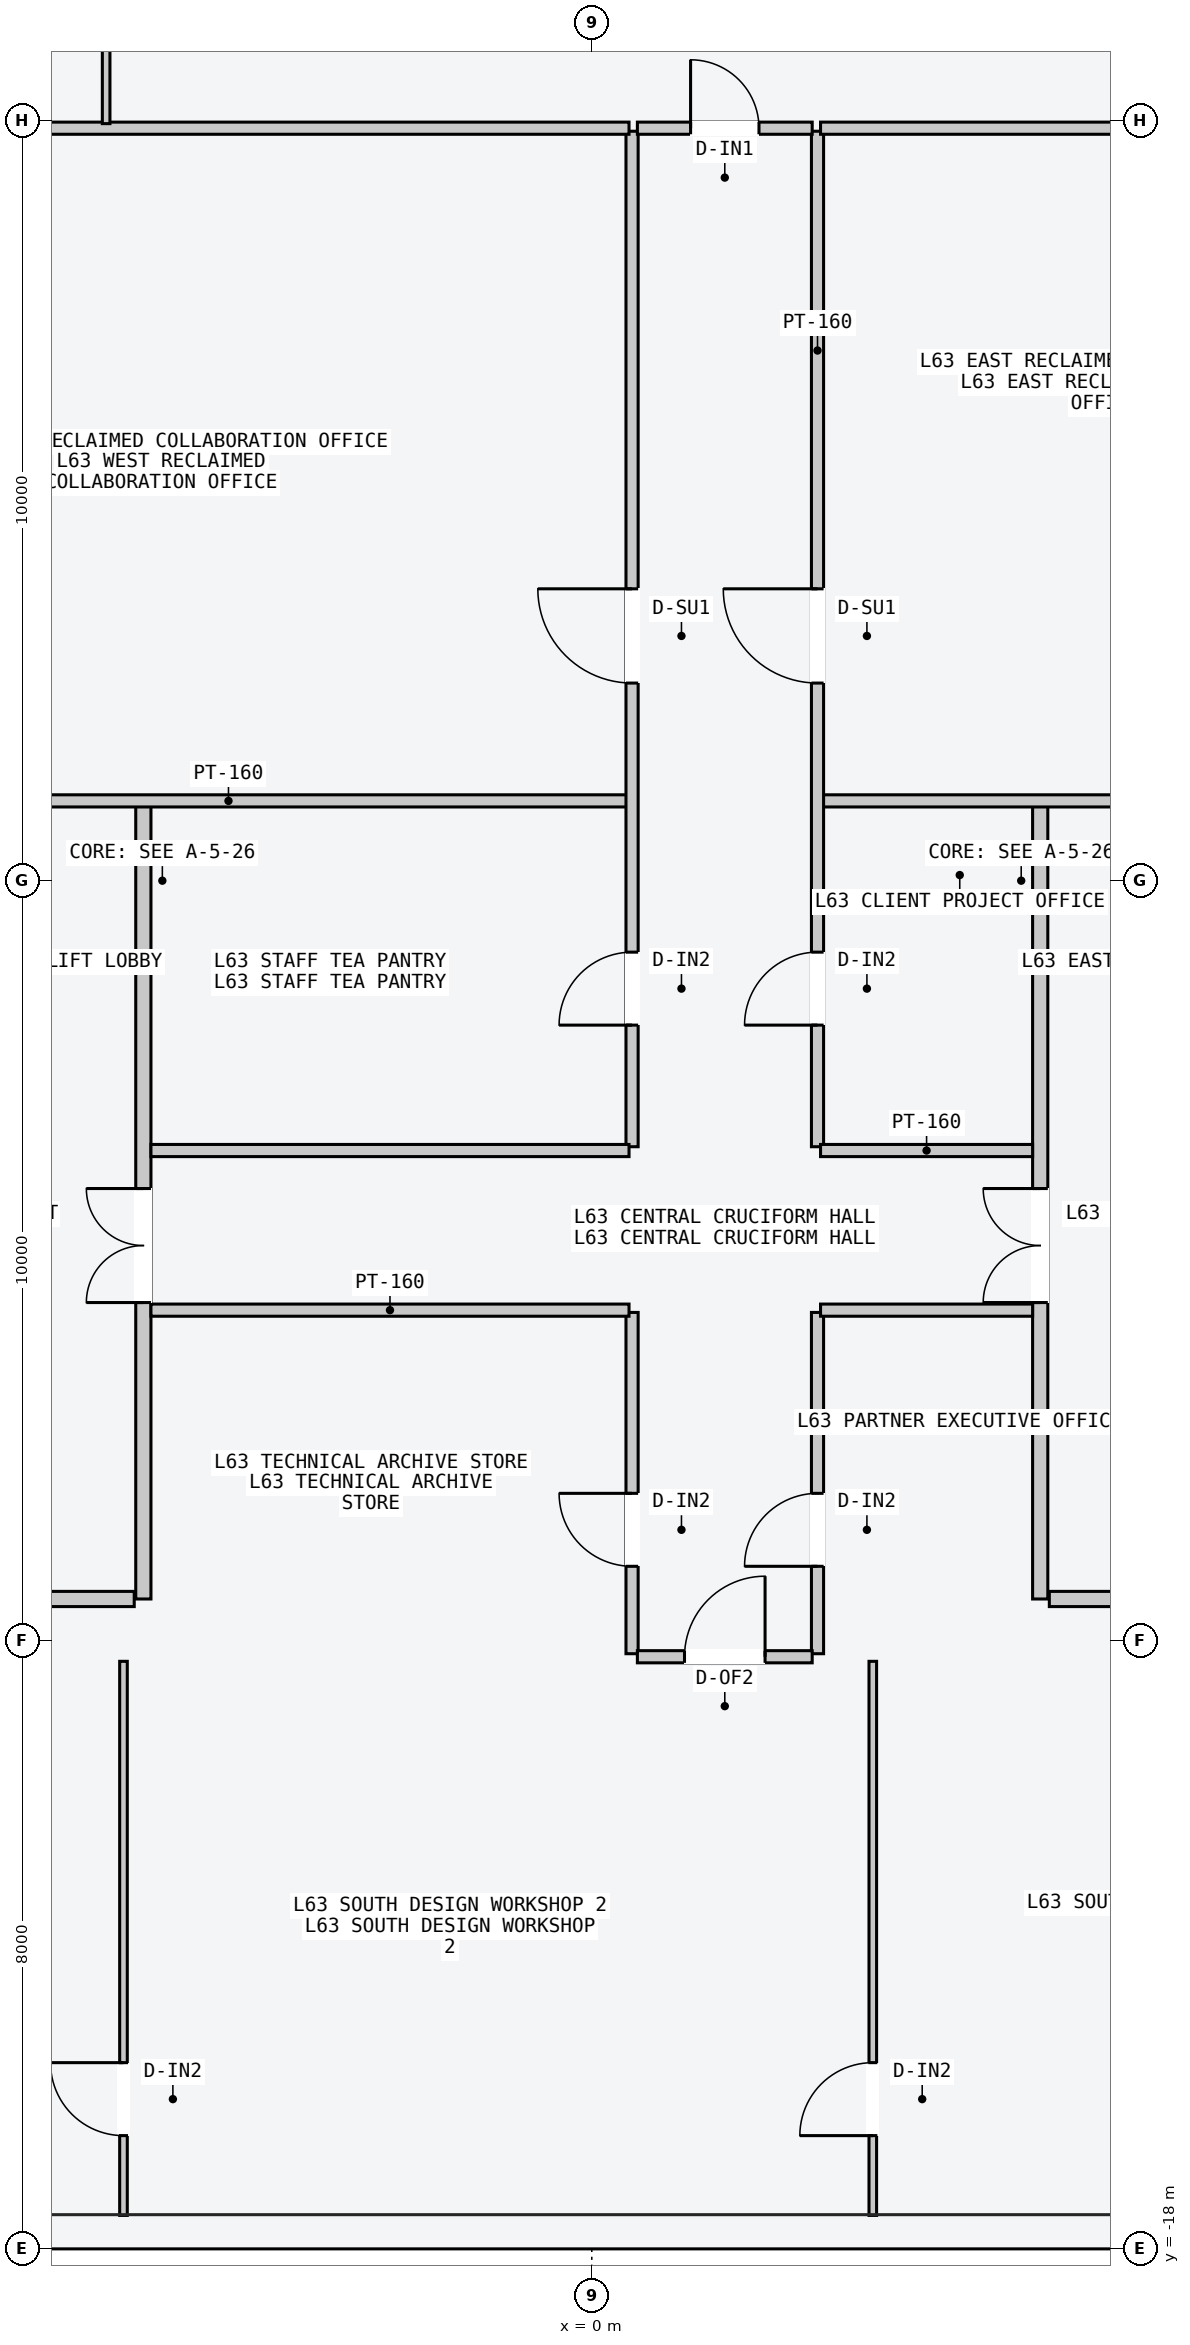
"""IFC4 building model, lengths in metres.
Left out: names, types, materials, properties, quantities, classifications, styles, units other than length and angle.
Written with IfcOpenShell. Run it as: python <this file> out.ifc"""

import sys

from ifc_helpers import new_model, si_unit, direction, frame, frame_2d, origin, place, context, subcontext, project, spatial, rectangle, extrude, element, fill, save


model = new_model("IFC4")
c1 = context("Model", 3, precision=1e-05, world=origin(), true_north=direction((0.0, 1.0)))
c2 = subcontext(c1, "Body", "Model", "MODEL_VIEW")
j1 = project(units=[si_unit("LENGTHUNIT", "METRE"), si_unit("PLANEANGLEUNIT", "RADIAN")], contexts=[c1])
p1 = place(None, origin())
s1 = spatial("IfcSite", under=j1, at=p1, CompositionType="ELEMENT")
p2 = place(p1, origin())
s2 = spatial("IfcBuilding", under=s1, at=p2, CompositionType="ELEMENT")
p3 = place(p2, frame((0.0, 0.0, 240.0)))
s3 = spatial("IfcBuildingStorey", under=s2, at=p3, CompositionType="ELEMENT", Elevation=240.0)
p4 = place(p3, frame((-5.9, -9.45, 0.0), z_axis=(0.0, 0.0, 1.0), x_axis=(0.0, 1.0, 0.0)))
e1 = element("IfcWall", 1, at=p4, inside=s3, PredefinedType="PARTITIONING", context=c2, shape_type="SweptSolid", body=[
    extrude(rectangle(XDim=10.5, YDim=0.2, at=frame_2d((5.25, 0.0))), origin(), (0.0, 0.0, 1.0), 3.4),
])
p5 = place(p4, frame((3.9, 0.0, 0.0)))
e2 = element("IfcOpeningElement", 2, at=p5, cuts=e1, PredefinedType="OPENING", context=c2, shape_type="SweptSolid", body=[
    extrude(rectangle(XDim=1.5, YDim=2.2, at=frame_2d((0.75, 1.1))), frame((0.0, 0.11, 0.0), z_axis=(0.0, -1.0, 0.0), x_axis=(1.0, 0.0, 0.0)), (0.0, 0.0, 1.0), 0.22),
])
p6 = place(p3, frame((-6.02, -9.45, 0.0), z_axis=(0.0, 0.0, 1.0), x_axis=(-1.0, 0.0, 0.0)))
e3 = element("IfcWall", 3, at=p6, inside=s3, PredefinedType="PARTITIONING", context=c2, shape_type="SweptSolid", body=[
    extrude(rectangle(XDim=1.8, YDim=0.2, at=frame_2d((0.9, 0.0))), origin(), (0.0, 0.0, 1.0), 3.4),
])
p7 = place(p3, frame((5.9, -9.45, 0.0), z_axis=(0.0, 0.0, 1.0), x_axis=(0.0, 1.0, 0.0)))
e4 = element("IfcWall", 4, at=p7, inside=s3, PredefinedType="PARTITIONING", context=c2, shape_type="SweptSolid", body=[
    extrude(rectangle(XDim=10.5, YDim=0.2, at=frame_2d((5.25, 0.0))), origin(), (0.0, 0.0, 1.0), 3.4),
])
p8 = place(p7, frame((3.9, 0.0, 0.0)))
e5 = element("IfcOpeningElement", 5, at=p8, cuts=e4, PredefinedType="OPENING", context=c2, shape_type="SweptSolid", body=[
    extrude(rectangle(XDim=1.5, YDim=2.2, at=frame_2d((0.75, 1.1))), frame((0.0, 0.11, 0.0), z_axis=(0.0, -1.0, 0.0), x_axis=(1.0, 0.0, 0.0)), (0.0, 0.0, 1.0), 0.22),
])
p9 = place(p3, frame((6.02, -9.45, 0.0), z_axis=(0.0, 0.0, 1.0), x_axis=(1.0, 0.0, 0.0)))
e6 = element("IfcWall", 6, at=p9, inside=s3, PredefinedType="PARTITIONING", context=c2, shape_type="SweptSolid", body=[
    extrude(rectangle(XDim=1.8, YDim=0.2, at=frame_2d((0.9, 0.0))), origin(), (0.0, 0.0, 1.0), 3.4),
])
p10 = place(p3, frame((-10.05, 1.05, 0.0), z_axis=(0.0, 0.0, 1.0), x_axis=(1.0, 0.0, 0.0)))
e7 = element("IfcWall", 7, at=p10, inside=s3, PredefinedType="PARTITIONING", context=c2, shape_type="SweptSolid", body=[
    extrude(rectangle(XDim=10.54, YDim=0.16, at=frame_2d((5.27, 0.0))), origin(), (0.0, 0.0, 1.0), 3.4),
])
p11 = place(p3, frame((0.53, -3.5, 0.0), z_axis=(0.0, 0.0, 1.0), x_axis=(0.0, 1.0, 0.0)))
e8 = element("IfcWall", 8, at=p11, inside=s3, PredefinedType="PARTITIONING", context=c2, shape_type="SweptSolid", body=[
    extrude(rectangle(XDim=13.36, YDim=0.16, at=frame_2d((6.68, 0.0))), origin(), (0.0, 0.0, 1.0), 3.4),
])
p12 = place(p11, frame((6.1, 0.0, 0.0)))
e9 = element("IfcOpeningElement", 9, at=p12, cuts=e8, PredefinedType="OPENING", context=c2, shape_type="SweptSolid", body=[
    extrude(rectangle(XDim=1.24, YDim=2.24, at=frame_2d((0.62, 1.12))), frame((0.0, 0.09, 0.0), z_axis=(0.0, -1.0, 0.0), x_axis=(1.0, 0.0, 0.0)), (0.0, 0.0, 1.0), 0.18),
])
p13 = place(p11, frame((1.6, 0.0, 0.0)))
e10 = element("IfcOpeningElement", 10, at=p13, cuts=e8, PredefinedType="OPENING", context=c2, shape_type="SweptSolid", body=[
    extrude(rectangle(XDim=0.96, YDim=2.18, at=frame_2d((0.48, 1.09))), frame((0.0, 0.09, 0.0), z_axis=(0.0, -1.0, 0.0), x_axis=(1.0, 0.0, 0.0)), (0.0, 0.0, 1.0), 0.18),
])
p14 = place(p3, frame((-7.5, 9.9, 0.0), z_axis=(0.0, 0.0, 1.0), x_axis=(1.0, 0.0, 0.0)))
e11 = element("IfcWall", 11, at=p14, inside=s3, PredefinedType="PARTITIONING", context=c2, shape_type="SweptSolid", body=[
    extrude(rectangle(XDim=7.99, YDim=0.16, at=frame_2d((3.995, 0.0))), origin(), (0.0, 0.0, 1.0), 3.4),
])
p15 = place(p3, frame((-5.8, -3.55, 0.0), z_axis=(0.0, 0.0, 1.0), x_axis=(1.0, 0.0, 0.0)))
e12 = element("IfcWall", 12, at=p15, inside=s3, PredefinedType="PARTITIONING", context=c2, shape_type="SweptSolid", body=[
    extrude(rectangle(XDim=6.29, YDim=0.16, at=frame_2d((3.145, 0.0))), origin(), (0.0, 0.0, 1.0), 3.4),
])
p16 = place(p3, frame((3.01, 1.05, 0.0), z_axis=(0.0, 0.0, 1.0), x_axis=(1.0, 0.0, 0.0)))
e13 = element("IfcWall", 13, at=p16, inside=s3, PredefinedType="PARTITIONING", context=c2, shape_type="SweptSolid", body=[
    extrude(rectangle(XDim=7.05, YDim=0.16, at=frame_2d((3.525, 0.0))), origin(), (0.0, 0.0, 1.0), 3.4),
])
p17 = place(p3, frame((2.97, -3.5, 0.0), z_axis=(0.0, 0.0, 1.0), x_axis=(0.0, 1.0, 0.0)))
e14 = element("IfcWall", 14, at=p17, inside=s3, PredefinedType="PARTITIONING", context=c2, shape_type="SweptSolid", body=[
    extrude(rectangle(XDim=13.36, YDim=0.16, at=frame_2d((6.68, 0.0))), origin(), (0.0, 0.0, 1.0), 3.4),
])
p18 = place(p17, frame((6.1, 0.0, 0.0)))
e15 = element("IfcOpeningElement", 15, at=p18, cuts=e14, PredefinedType="OPENING", context=c2, shape_type="SweptSolid", body=[
    extrude(rectangle(XDim=1.24, YDim=2.24, at=frame_2d((0.62, 1.12))), frame((0.0, 0.09, 0.0), z_axis=(0.0, -1.0, 0.0), x_axis=(1.0, 0.0, 0.0)), (0.0, 0.0, 1.0), 0.18),
])
p19 = place(p17, frame((1.6, 0.0, 0.0)))
e16 = element("IfcOpeningElement", 16, at=p19, cuts=e14, PredefinedType="OPENING", context=c2, shape_type="SweptSolid", body=[
    extrude(rectangle(XDim=0.96, YDim=2.18, at=frame_2d((0.48, 1.09))), frame((0.0, 0.09, 0.0), z_axis=(0.0, -1.0, 0.0), x_axis=(1.0, 0.0, 0.0)), (0.0, 0.0, 1.0), 0.18),
])
p20 = place(p3, frame((3.01, 9.9, 0.0), z_axis=(0.0, 0.0, 1.0), x_axis=(1.0, 0.0, 0.0)))
e17 = element("IfcWall", 17, at=p20, inside=s3, PredefinedType="PARTITIONING", context=c2, shape_type="SweptSolid", body=[
    extrude(rectangle(XDim=4.49, YDim=0.16, at=frame_2d((2.245, 0.0))), origin(), (0.0, 0.0, 1.0), 3.4),
])
p21 = place(p3, frame((3.01, -3.55, 0.0), z_axis=(0.0, 0.0, 1.0), x_axis=(1.0, 0.0, 0.0)))
e18 = element("IfcWall", 18, at=p21, inside=s3, PredefinedType="PARTITIONING", context=c2, shape_type="SweptSolid", body=[
    extrude(rectangle(XDim=2.79, YDim=0.16, at=frame_2d((1.395, 0.0))), origin(), (0.0, 0.0, 1.0), 3.4),
])
p22 = place(p3, frame((0.53, -10.17, 0.0), z_axis=(0.0, 0.0, 1.0), x_axis=(0.0, 1.0, 0.0)))
e19 = element("IfcWall", 19, at=p22, inside=s3, PredefinedType="PARTITIONING", context=c2, shape_type="SweptSolid", body=[
    extrude(rectangle(XDim=4.49, YDim=0.16, at=frame_2d((2.245, 0.0))), origin(), (0.0, 0.0, 1.0), 3.4),
])
p23 = place(p22, frame((1.15, 0.0, 0.0)))
e20 = element("IfcOpeningElement", 20, at=p23, cuts=e19, PredefinedType="OPENING", context=c2, shape_type="SweptSolid", body=[
    extrude(rectangle(XDim=0.96, YDim=2.18, at=frame_2d((0.48, 1.09))), frame((0.0, 0.09, 0.0), z_axis=(0.0, -1.0, 0.0), x_axis=(1.0, 0.0, 0.0)), (0.0, 0.0, 1.0), 0.18),
])
p24 = place(p3, frame((2.97, -10.17, 0.0), z_axis=(0.0, 0.0, 1.0), x_axis=(0.0, 1.0, 0.0)))
e21 = element("IfcWall", 21, at=p24, inside=s3, PredefinedType="PARTITIONING", context=c2, shape_type="SweptSolid", body=[
    extrude(rectangle(XDim=4.49, YDim=0.16, at=frame_2d((2.245, 0.0))), origin(), (0.0, 0.0, 1.0), 3.4),
])
p25 = place(p24, frame((1.15, 0.0, 0.0)))
e22 = element("IfcOpeningElement", 22, at=p25, cuts=e21, PredefinedType="OPENING", context=c2, shape_type="SweptSolid", body=[
    extrude(rectangle(XDim=0.96, YDim=2.18, at=frame_2d((0.48, 1.09))), frame((0.0, 0.09, 0.0), z_axis=(0.0, -1.0, 0.0), x_axis=(1.0, 0.0, 0.0)), (0.0, 0.0, 1.0), 0.18),
])
p26 = place(p3, frame((-5.8, -5.65, 0.0), z_axis=(0.0, 0.0, 1.0), x_axis=(1.0, 0.0, 0.0)))
e23 = element("IfcWall", 23, at=p26, inside=s3, PredefinedType="PARTITIONING", context=c2, shape_type="SweptSolid", body=[
    extrude(rectangle(XDim=6.29, YDim=0.16, at=frame_2d((3.145, 0.0))), origin(), (0.0, 0.0, 1.0), 3.4),
])
p27 = place(p3, frame((3.01, -5.65, 0.0), z_axis=(0.0, 0.0, 1.0), x_axis=(1.0, 0.0, 0.0)))
e24 = element("IfcWall", 24, at=p27, inside=s3, PredefinedType="PARTITIONING", context=c2, shape_type="SweptSolid", body=[
    extrude(rectangle(XDim=2.79, YDim=0.16, at=frame_2d((1.395, 0.0))), origin(), (0.0, 0.0, 1.0), 3.4),
])
p28 = place(p3, frame((-6.39, 9.96, 0.0), z_axis=(0.0, 0.0, 1.0), x_axis=(0.0, 1.0, 0.0)))
e25 = element("IfcWall", 25, at=p28, inside=s3, PredefinedType="PARTITIONING", context=c2, shape_type="SweptSolid", body=[
    extrude(rectangle(XDim=7.6, YDim=0.1, at=frame_2d((3.8, 0.0))), origin(), (0.0, 0.0, 1.0), 3.4),
])
p29 = place(p28, frame((1.15, 0.0, 0.0)))
e26 = element("IfcOpeningElement", 26, at=p29, cuts=e25, PredefinedType="OPENING", context=c2, shape_type="SweptSolid", body=[
    extrude(rectangle(XDim=0.96, YDim=2.18, at=frame_2d((0.48, 1.09))), frame((0.0, 0.06, 0.0), z_axis=(0.0, -1.0, 0.0), x_axis=(1.0, 0.0, 0.0)), (0.0, 0.0, 1.0), 0.12),
])
p30 = place(p3, frame((0.6, 9.9, 0.0), z_axis=(0.0, 0.0, 1.0), x_axis=(1.0, 0.0, 0.0)))
e27 = element("IfcWall", 27, at=p30, inside=s3, PredefinedType="PARTITIONING", context=c2, shape_type="SweptSolid", body=[
    extrude(rectangle(XDim=2.3, YDim=0.16, at=frame_2d((1.15, 0.0))), origin(), (0.0, 0.0, 1.0), 3.4),
])
p31 = place(p30, frame((0.7, 0.0, 0.0)))
e28 = element("IfcOpeningElement", 28, at=p31, cuts=e27, PredefinedType="OPENING", context=c2, shape_type="SweptSolid", body=[
    extrude(rectangle(XDim=0.9, YDim=2.15, at=frame_2d((0.45, 1.075))), frame((0.0, 0.09, 0.0), z_axis=(0.0, -1.0, 0.0), x_axis=(1.0, 0.0, 0.0)), (0.0, 0.0, 1.0), 0.18),
])
p32 = place(p3, frame((-6.161, -17.56, 0.0), z_axis=(0.0, 0.0, 1.0), x_axis=(0.0, 1.0, 0.0)))
e29 = element("IfcWall", 29, at=p32, inside=s3, PredefinedType="PARTITIONING", context=c2, shape_type="SweptSolid", body=[
    extrude(rectangle(XDim=7.29, YDim=0.1, at=frame_2d((3.645, 0.0))), origin(), (0.0, 0.0, 1.0), 3.4),
])
p33 = place(p32, frame((1.05, 0.0, 0.0)))
e30 = element("IfcOpeningElement", 30, at=p33, cuts=e29, PredefinedType="OPENING", context=c2, shape_type="SweptSolid", body=[
    extrude(rectangle(XDim=0.96, YDim=2.18, at=frame_2d((0.48, 1.09))), frame((0.0, 0.06, 0.0), z_axis=(0.0, -1.0, 0.0), x_axis=(1.0, 0.0, 0.0)), (0.0, 0.0, 1.0), 0.12),
])
p34 = place(p3, frame((3.698, -17.56, 0.0), z_axis=(0.0, 0.0, 1.0), x_axis=(0.0, 1.0, 0.0)))
e31 = element("IfcWall", 31, at=p34, inside=s3, PredefinedType="PARTITIONING", context=c2, shape_type="SweptSolid", body=[
    extrude(rectangle(XDim=7.29, YDim=0.1, at=frame_2d((3.645, 0.0))), origin(), (0.0, 0.0, 1.0), 3.4),
])
p35 = place(p34, frame((1.05, 0.0, 0.0)))
e32 = element("IfcOpeningElement", 32, at=p35, cuts=e31, PredefinedType="OPENING", context=c2, shape_type="SweptSolid", body=[
    extrude(rectangle(XDim=0.96, YDim=2.18, at=frame_2d((0.48, 1.09))), frame((0.0, 0.06, 0.0), z_axis=(0.0, -1.0, 0.0), x_axis=(1.0, 0.0, 0.0)), (0.0, 0.0, 1.0), 0.12),
])
p36 = place(p3, frame((0.6, -10.21, 0.0), z_axis=(0.0, 0.0, 1.0), x_axis=(1.0, 0.0, 0.0)))
e33 = element("IfcWall", 33, at=p36, inside=s3, PredefinedType="PARTITIONING", context=c2, shape_type="SweptSolid", body=[
    extrude(rectangle(XDim=2.3, YDim=0.16, at=frame_2d((1.15, 0.0))), origin(), (0.0, 0.0, 1.0), 3.4),
])
p37 = place(p36, frame((0.62, 0.0, 0.0)))
e34 = element("IfcOpeningElement", 34, at=p37, cuts=e33, PredefinedType="OPENING", context=c2, shape_type="SweptSolid", body=[
    extrude(rectangle(XDim=1.06, YDim=2.2, at=frame_2d((0.53, 1.1))), frame((0.0, 0.09, 0.0), z_axis=(0.0, -1.0, 0.0), x_axis=(1.0, 0.0, 0.0)), (0.0, 0.0, 1.0), 0.18),
])
p38 = place(p5, origin())
e35 = element("IfcDoor", 35, at=p38, inside=s3, OperationType="DOUBLE_DOOR_SINGLE_SWING", PredefinedType="DOOR", context=c2, shape_type="SweptSolid", body=[
    extrude(rectangle(XDim=1.5, YDim=2.2, at=frame_2d((0.75, 1.1))), frame((0.0, 0.025, 0.0), z_axis=(0.0, -1.0, 0.0), x_axis=(1.0, 0.0, 0.0)), (0.0, 0.0, 1.0), 0.05),
])
fill(e2, e35)
p39 = place(p8, origin())
e36 = element("IfcDoor", 36, at=p39, inside=s3, OperationType="DOUBLE_DOOR_SINGLE_SWING", PredefinedType="DOOR", context=c2, shape_type="SweptSolid", body=[
    extrude(rectangle(XDim=1.5, YDim=2.2, at=frame_2d((0.75, 1.1))), frame((0.0, 0.025, 0.0), z_axis=(0.0, -1.0, 0.0), x_axis=(1.0, 0.0, 0.0)), (0.0, 0.0, 1.0), 0.05),
])
fill(e5, e36)
p40 = place(p12, origin())
e37 = element("IfcDoor", 37, at=p40, inside=s3, OperationType="SINGLE_SWING_RIGHT", PredefinedType="DOOR", context=c2, shape_type="SweptSolid", body=[
    extrude(rectangle(XDim=1.24, YDim=2.24, at=frame_2d((0.62, 1.12))), frame((0.0, 0.025, 0.0), z_axis=(0.0, -1.0, 0.0), x_axis=(1.0, 0.0, 0.0)), (0.0, 0.0, 1.0), 0.05),
])
fill(e9, e37)
p41 = place(p13, origin())
e38 = element("IfcDoor", 38, at=p41, inside=s3, OperationType="SINGLE_SWING_LEFT", PredefinedType="DOOR", context=c2, shape_type="SweptSolid", body=[
    extrude(rectangle(XDim=0.96, YDim=2.18, at=frame_2d((0.48, 1.09))), frame((0.0, 0.025, 0.0), z_axis=(0.0, -1.0, 0.0), x_axis=(1.0, 0.0, 0.0)), (0.0, 0.0, 1.0), 0.05),
])
fill(e10, e38)
p42 = place(p18, origin())
e39 = element("IfcDoor", 39, at=p42, inside=s3, OperationType="SINGLE_SWING_RIGHT", PredefinedType="DOOR", context=c2, shape_type="SweptSolid", body=[
    extrude(rectangle(XDim=1.24, YDim=2.24, at=frame_2d((0.62, 1.12))), frame((0.0, 0.025, 0.0), z_axis=(0.0, -1.0, 0.0), x_axis=(1.0, 0.0, 0.0)), (0.0, 0.0, 1.0), 0.05),
])
fill(e15, e39)
p43 = place(p19, origin())
e40 = element("IfcDoor", 40, at=p43, inside=s3, OperationType="SINGLE_SWING_LEFT", PredefinedType="DOOR", context=c2, shape_type="SweptSolid", body=[
    extrude(rectangle(XDim=0.96, YDim=2.18, at=frame_2d((0.48, 1.09))), frame((0.0, 0.025, 0.0), z_axis=(0.0, -1.0, 0.0), x_axis=(1.0, 0.0, 0.0)), (0.0, 0.0, 1.0), 0.05),
])
fill(e16, e40)
p44 = place(p23, origin())
e41 = element("IfcDoor", 41, at=p44, inside=s3, OperationType="SINGLE_SWING_RIGHT", PredefinedType="DOOR", context=c2, shape_type="SweptSolid", body=[
    extrude(rectangle(XDim=0.96, YDim=2.18, at=frame_2d((0.48, 1.09))), frame((0.0, 0.025, 0.0), z_axis=(0.0, -1.0, 0.0), x_axis=(1.0, 0.0, 0.0)), (0.0, 0.0, 1.0), 0.05),
])
fill(e20, e41)
p45 = place(p25, origin())
e42 = element("IfcDoor", 42, at=p45, inside=s3, OperationType="SINGLE_SWING_LEFT", PredefinedType="DOOR", context=c2, shape_type="SweptSolid", body=[
    extrude(rectangle(XDim=0.96, YDim=2.18, at=frame_2d((0.48, 1.09))), frame((0.0, 0.025, 0.0), z_axis=(0.0, -1.0, 0.0), x_axis=(1.0, 0.0, 0.0)), (0.0, 0.0, 1.0), 0.05),
])
fill(e22, e42)
p46 = place(p31, origin())
e43 = element("IfcDoor", 43, at=p46, inside=s3, OperationType="SINGLE_SWING_LEFT", PredefinedType="DOOR", context=c2, shape_type="SweptSolid", body=[
    extrude(rectangle(XDim=0.9, YDim=2.15, at=frame_2d((0.45, 1.075))), frame((0.0, 0.025, 0.0), z_axis=(0.0, -1.0, 0.0), x_axis=(1.0, 0.0, 0.0)), (0.0, 0.0, 1.0), 0.05),
])
fill(e28, e43)
p47 = place(p33, origin())
e44 = element("IfcDoor", 44, at=p47, inside=s3, OperationType="SINGLE_SWING_RIGHT", PredefinedType="DOOR", context=c2, shape_type="SweptSolid", body=[
    extrude(rectangle(XDim=0.96, YDim=2.18, at=frame_2d((0.48, 1.09))), frame((0.0, 0.025, 0.0), z_axis=(0.0, -1.0, 0.0), x_axis=(1.0, 0.0, 0.0)), (0.0, 0.0, 1.0), 0.05),
])
fill(e30, e44)
p48 = place(p35, origin())
e45 = element("IfcDoor", 45, at=p48, inside=s3, OperationType="SINGLE_SWING_LEFT", PredefinedType="DOOR", context=c2, shape_type="SweptSolid", body=[
    extrude(rectangle(XDim=0.96, YDim=2.18, at=frame_2d((0.48, 1.09))), frame((0.0, 0.025, 0.0), z_axis=(0.0, -1.0, 0.0), x_axis=(1.0, 0.0, 0.0)), (0.0, 0.0, 1.0), 0.05),
])
fill(e32, e45)
p49 = place(p37, origin())
e46 = element("IfcDoor", 46, at=p49, inside=s3, OperationType="SINGLE_SWING_RIGHT", PredefinedType="DOOR", context=c2, shape_type="SweptSolid", body=[
    extrude(rectangle(XDim=1.06, YDim=2.2, at=frame_2d((0.53, 1.1))), frame((0.0, 0.025, 0.0), z_axis=(0.0, -1.0, 0.0), x_axis=(1.0, 0.0, 0.0)), (0.0, 0.0, 1.0), 0.05),
])
fill(e34, e46)
save(model, sys.argv[1])
